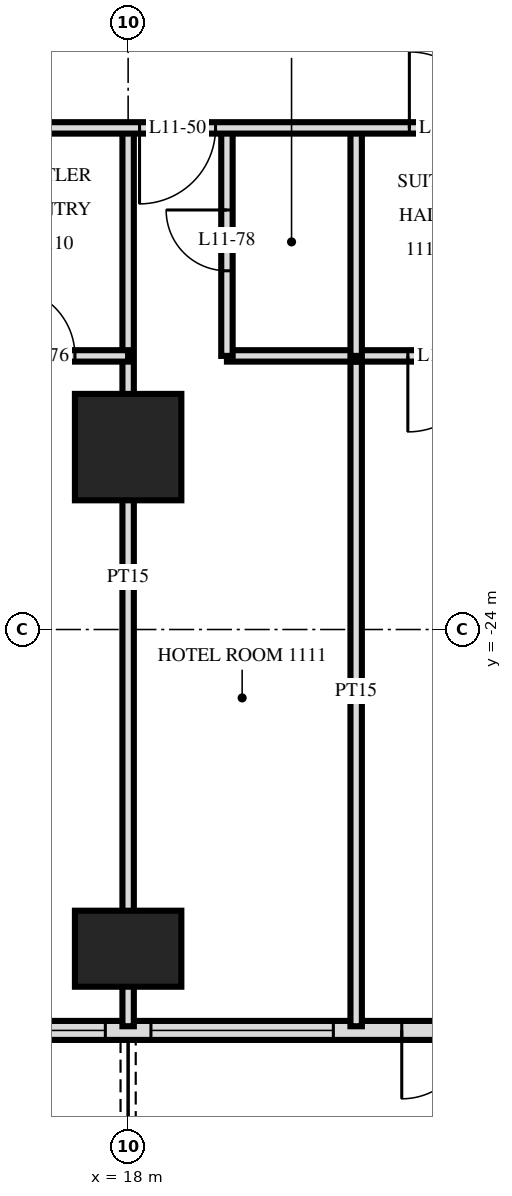
"""IFC4 building model, lengths in metres.
Left out: names, types, materials, properties, quantities, classifications, styles, units other than length and angle.
Written with IfcOpenShell. Run it as: python <this file> out.ifc"""

import sys

from ifc_helpers import new_model, si_unit, direction, frame, frame_2d, origin, origin_2d, place, context, subcontext, project, spatial, rectangle, extrude, element, fill, save


model = new_model("IFC4")
c1 = context("Model", 3, precision=1e-05, world=origin(), true_north=direction((0.0, 1.0)))
c2 = subcontext(c1, "Body", "Model", "MODEL_VIEW")
j1 = project(units=[si_unit("LENGTHUNIT", "METRE"), si_unit("PLANEANGLEUNIT", "RADIAN")], contexts=[c1])
p1 = place(None, origin())
s1 = spatial("IfcSite", under=j1, at=p1, CompositionType="ELEMENT")
p2 = place(p1, origin())
s2 = spatial("IfcBuilding", under=s1, at=p2, CompositionType="ELEMENT")
p3 = place(p2, frame((0.0, 0.0, 49.2)))
s3 = spatial("IfcBuildingStorey", under=s2, at=p3, CompositionType="ELEMENT", Elevation=49.2)
p4 = place(p3, frame((18.0, -28.2, 0.0), z_axis=(0.0, 0.0, 1.0), x_axis=(1.0, 0.0, 0.0)))
e1 = element("IfcColumn", 1, at=p4, inside=s3, PredefinedType="COLUMN", context=c2, shape_type="SweptSolid", body=[
    extrude(rectangle(XDim=1.4, YDim=1.0, at=origin_2d()), origin(), (0.0, 0.0, 1.0), 3.6),
])
p5 = place(p3, frame((18.0, -21.6, 0.0), z_axis=(0.0, 0.0, 1.0), x_axis=(1.0, 0.0, 0.0)))
e2 = element("IfcColumn", 2, at=p5, inside=s3, PredefinedType="COLUMN", context=c2, shape_type="SweptSolid", body=[
    extrude(rectangle(XDim=1.4, YDim=1.4, at=origin_2d()), origin(), (0.0, 0.0, 1.0), 3.6),
])
p6 = place(p3, frame((-28.775, -29.275, 0.0), z_axis=(0.0, 0.0, 1.0), x_axis=(1.0, 0.0, 0.0)))
e3 = element("IfcWall", 3, at=p6, inside=s3, PredefinedType="SOLIDWALL", context=c2, shape_type="SweptSolid", body=[
    extrude(rectangle(XDim=57.551, YDim=0.25, at=frame_2d((28.775, 0.0))), origin(), (0.0, 0.0, 1.0), 3.32),
])
p7 = place(p6, frame((0.575, 0.0, 0.0)))
e4 = element("IfcOpeningElement", 4, at=p7, cuts=e3, PredefinedType="OPENING", context=c2, shape_type="SweptSolid", body=[
    extrude(rectangle(XDim=1.8, YDim=2.4, at=frame_2d((0.9, 1.2))), frame((0.0, 0.135, 0.0), z_axis=(0.0, -1.0, 0.0), x_axis=(1.0, 0.0, 0.0)), (0.0, 0.0, 1.0), 0.27),
])
p8 = place(p6, frame((5.375, 0.0, 0.0)))
e5 = element("IfcOpeningElement", 5, at=p8, cuts=e3, PredefinedType="OPENING", context=c2, shape_type="SweptSolid", body=[
    extrude(rectangle(XDim=1.8, YDim=2.4, at=frame_2d((0.9, 1.2))), frame((0.0, 0.135, 0.0), z_axis=(0.0, -1.0, 0.0), x_axis=(1.0, 0.0, 0.0)), (0.0, 0.0, 1.0), 0.27),
])
p9 = place(p6, frame((8.075, 0.0, 0.3)))
e6 = element("IfcOpeningElement", 6, at=p9, cuts=e3, PredefinedType="OPENING", context=c2, shape_type="SweptSolid", body=[
    extrude(rectangle(XDim=2.4, YDim=2.1, at=frame_2d((1.2, 1.05))), frame((0.0, 0.135, 0.0), z_axis=(0.0, -1.0, 0.0), x_axis=(1.0, 0.0, 0.0)), (0.0, 0.0, 1.0), 0.27),
])
p10 = place(p6, frame((11.375, 0.0, 0.0)))
e7 = element("IfcOpeningElement", 7, at=p10, cuts=e3, PredefinedType="OPENING", context=c2, shape_type="SweptSolid", body=[
    extrude(rectangle(XDim=1.8, YDim=2.4, at=frame_2d((0.9, 1.2))), frame((0.0, 0.135, 0.0), z_axis=(0.0, -1.0, 0.0), x_axis=(1.0, 0.0, 0.0)), (0.0, 0.0, 1.0), 0.27),
])
p11 = place(p6, frame((14.075, 0.0, 0.3)))
e8 = element("IfcOpeningElement", 8, at=p11, cuts=e3, PredefinedType="OPENING", context=c2, shape_type="SweptSolid", body=[
    extrude(rectangle(XDim=2.4, YDim=2.1, at=frame_2d((1.2, 1.05))), frame((0.0, 0.135, 0.0), z_axis=(0.0, -1.0, 0.0), x_axis=(1.0, 0.0, 0.0)), (0.0, 0.0, 1.0), 0.27),
])
p12 = place(p6, frame((17.375, 0.0, 0.0)))
e9 = element("IfcOpeningElement", 9, at=p12, cuts=e3, PredefinedType="OPENING", context=c2, shape_type="SweptSolid", body=[
    extrude(rectangle(XDim=1.8, YDim=2.4, at=frame_2d((0.9, 1.2))), frame((0.0, 0.135, 0.0), z_axis=(0.0, -1.0, 0.0), x_axis=(1.0, 0.0, 0.0)), (0.0, 0.0, 1.0), 0.27),
])
p13 = place(p6, frame((20.075, 0.0, 0.3)))
e10 = element("IfcOpeningElement", 10, at=p13, cuts=e3, PredefinedType="OPENING", context=c2, shape_type="SweptSolid", body=[
    extrude(rectangle(XDim=2.4, YDim=2.1, at=frame_2d((1.2, 1.05))), frame((0.0, 0.135, 0.0), z_axis=(0.0, -1.0, 0.0), x_axis=(1.0, 0.0, 0.0)), (0.0, 0.0, 1.0), 0.27),
])
p14 = place(p6, frame((23.075, 0.0, 0.3)))
e11 = element("IfcOpeningElement", 11, at=p14, cuts=e3, PredefinedType="OPENING", context=c2, shape_type="SweptSolid", body=[
    extrude(rectangle(XDim=2.4, YDim=2.1, at=frame_2d((1.2, 1.05))), frame((0.0, 0.135, 0.0), z_axis=(0.0, -1.0, 0.0), x_axis=(1.0, 0.0, 0.0)), (0.0, 0.0, 1.0), 0.27),
])
p15 = place(p6, frame((26.375, 0.0, 0.0)))
e12 = element("IfcOpeningElement", 12, at=p15, cuts=e3, PredefinedType="OPENING", context=c2, shape_type="SweptSolid", body=[
    extrude(rectangle(XDim=1.8, YDim=2.4, at=frame_2d((0.9, 1.2))), frame((0.0, 0.135, 0.0), z_axis=(0.0, -1.0, 0.0), x_axis=(1.0, 0.0, 0.0)), (0.0, 0.0, 1.0), 0.27),
])
p16 = place(p6, frame((29.375, 0.0, 0.0)))
e13 = element("IfcOpeningElement", 13, at=p16, cuts=e3, PredefinedType="OPENING", context=c2, shape_type="SweptSolid", body=[
    extrude(rectangle(XDim=1.8, YDim=2.4, at=frame_2d((0.9, 1.2))), frame((0.0, 0.135, 0.0), z_axis=(0.0, -1.0, 0.0), x_axis=(1.0, 0.0, 0.0)), (0.0, 0.0, 1.0), 0.27),
])
p17 = place(p6, frame((32.075, 0.0, 0.3)))
e14 = element("IfcOpeningElement", 14, at=p17, cuts=e3, PredefinedType="OPENING", context=c2, shape_type="SweptSolid", body=[
    extrude(rectangle(XDim=2.4, YDim=2.1, at=frame_2d((1.2, 1.05))), frame((0.0, 0.135, 0.0), z_axis=(0.0, -1.0, 0.0), x_axis=(1.0, 0.0, 0.0)), (0.0, 0.0, 1.0), 0.27),
])
p18 = place(p6, frame((35.075, 0.0, 0.3)))
e15 = element("IfcOpeningElement", 15, at=p18, cuts=e3, PredefinedType="OPENING", context=c2, shape_type="SweptSolid", body=[
    extrude(rectangle(XDim=2.4, YDim=2.1, at=frame_2d((1.2, 1.05))), frame((0.0, 0.135, 0.0), z_axis=(0.0, -1.0, 0.0), x_axis=(1.0, 0.0, 0.0)), (0.0, 0.0, 1.0), 0.27),
])
p19 = place(p6, frame((38.375, 0.0, 0.0)))
e16 = element("IfcOpeningElement", 16, at=p19, cuts=e3, PredefinedType="OPENING", context=c2, shape_type="SweptSolid", body=[
    extrude(rectangle(XDim=1.8, YDim=2.4, at=frame_2d((0.9, 1.2))), frame((0.0, 0.135, 0.0), z_axis=(0.0, -1.0, 0.0), x_axis=(1.0, 0.0, 0.0)), (0.0, 0.0, 1.0), 0.27),
])
p20 = place(p6, frame((41.375, 0.0, 0.0)))
e17 = element("IfcOpeningElement", 17, at=p20, cuts=e3, PredefinedType="OPENING", context=c2, shape_type="SweptSolid", body=[
    extrude(rectangle(XDim=1.8, YDim=2.4, at=frame_2d((0.9, 1.2))), frame((0.0, 0.135, 0.0), z_axis=(0.0, -1.0, 0.0), x_axis=(1.0, 0.0, 0.0)), (0.0, 0.0, 1.0), 0.27),
])
p21 = place(p6, frame((44.075, 0.0, 0.3)))
e18 = element("IfcOpeningElement", 18, at=p21, cuts=e3, PredefinedType="OPENING", context=c2, shape_type="SweptSolid", body=[
    extrude(rectangle(XDim=2.4, YDim=2.1, at=frame_2d((1.2, 1.05))), frame((0.0, 0.135, 0.0), z_axis=(0.0, -1.0, 0.0), x_axis=(1.0, 0.0, 0.0)), (0.0, 0.0, 1.0), 0.27),
])
p22 = place(p6, frame((47.075, 0.0, 0.3)))
e19 = element("IfcOpeningElement", 19, at=p22, cuts=e3, PredefinedType="OPENING", context=c2, shape_type="SweptSolid", body=[
    extrude(rectangle(XDim=2.4, YDim=2.1, at=frame_2d((1.2, 1.05))), frame((0.0, 0.135, 0.0), z_axis=(0.0, -1.0, 0.0), x_axis=(1.0, 0.0, 0.0)), (0.0, 0.0, 1.0), 0.27),
])
p23 = place(p6, frame((50.375, 0.0, 0.0)))
e20 = element("IfcOpeningElement", 20, at=p23, cuts=e3, PredefinedType="OPENING", context=c2, shape_type="SweptSolid", body=[
    extrude(rectangle(XDim=1.8, YDim=2.4, at=frame_2d((0.9, 1.2))), frame((0.0, 0.135, 0.0), z_axis=(0.0, -1.0, 0.0), x_axis=(1.0, 0.0, 0.0)), (0.0, 0.0, 1.0), 0.27),
])
p24 = place(p6, frame((53.375, 0.0, 0.0)))
e21 = element("IfcOpeningElement", 21, at=p24, cuts=e3, PredefinedType="OPENING", context=c2, shape_type="SweptSolid", body=[
    extrude(rectangle(XDim=1.8, YDim=2.4, at=frame_2d((0.9, 1.2))), frame((0.0, 0.135, 0.0), z_axis=(0.0, -1.0, 0.0), x_axis=(1.0, 0.0, 0.0)), (0.0, 0.0, 1.0), 0.27),
])
p25 = place(p3, frame((21.0, -20.4, 0.0), z_axis=(0.0, 0.0, 1.0), x_axis=(0.0, 1.0, 0.0)))
e22 = element("IfcWall", 22, at=p25, inside=s3, PredefinedType="PARTITIONING", context=c2, shape_type="SweptSolid", body=[
    extrude(rectangle(XDim=3.0, YDim=0.15, at=frame_2d((1.5, 0.0))), origin(), (0.0, 0.0, 1.0), 3.32),
])
p26 = place(p3, frame((21.0, -29.22, 0.0), z_axis=(0.0, 0.0, 1.0), x_axis=(0.0, 1.0, 0.0)))
e23 = element("IfcWall", 23, at=p26, inside=s3, PredefinedType="PARTITIONING", context=c2, shape_type="SweptSolid", body=[
    extrude(rectangle(XDim=8.82, YDim=0.15, at=frame_2d((4.41, 0.0))), origin(), (0.0, 0.0, 1.0), 3.32),
])
p27 = place(p3, frame((19.3, -20.4, 0.0), z_axis=(0.0, 0.0, 1.0), x_axis=(0.0, 1.0, 0.0)))
e24 = element("IfcWall", 24, at=p27, inside=s3, PredefinedType="PARTITIONING", context=c2, shape_type="SweptSolid", body=[
    extrude(rectangle(XDim=3.0, YDim=0.15, at=frame_2d((1.5, 0.0))), origin(), (0.0, 0.0, 1.0), 3.32),
])
p28 = place(p27, frame((1.12, 0.0, 0.0)))
e25 = element("IfcOpeningElement", 25, at=p28, cuts=e24, PredefinedType="OPENING", context=c2, shape_type="SweptSolid", body=[
    extrude(rectangle(XDim=0.8, YDim=2.1, at=frame_2d((0.4, 1.05))), frame((0.0, 0.085, 0.0), z_axis=(0.0, -1.0, 0.0), x_axis=(1.0, 0.0, 0.0)), (0.0, 0.0, 1.0), 0.17),
])
p29 = place(p3, frame((18.0, -29.22, 0.0), z_axis=(0.0, 0.0, 1.0), x_axis=(0.0, 1.0, 0.0)))
e26 = element("IfcWall", 26, at=p29, inside=s3, PredefinedType="PARTITIONING", context=c2, shape_type="SweptSolid", body=[
    extrude(rectangle(XDim=11.82, YDim=0.15, at=frame_2d((5.91, 0.0))), origin(), (0.0, 0.0, 1.0), 3.32),
])
p30 = place(p3, frame((21.0, -20.4, 0.0), z_axis=(0.0, 0.0, 1.0), x_axis=(1.0, 0.0, 0.0)))
e27 = element("IfcWall", 27, at=p30, inside=s3, PredefinedType="PARTITIONING", context=c2, shape_type="SweptSolid", body=[
    extrude(rectangle(XDim=2.4, YDim=0.15, at=frame_2d((1.2, 0.0))), origin(), (0.0, 0.0, 1.0), 3.32),
])
p31 = place(p30, frame((0.68, 0.0, 0.0)))
e28 = element("IfcOpeningElement", 28, at=p31, cuts=e27, PredefinedType="OPENING", context=c2, shape_type="SweptSolid", body=[
    extrude(rectangle(XDim=1.0, YDim=2.1, at=frame_2d((0.5, 1.05))), frame((0.0, 0.085, 0.0), z_axis=(0.0, -1.0, 0.0), x_axis=(1.0, 0.0, 0.0)), (0.0, 0.0, 1.0), 0.17),
])
p32 = place(p3, frame((10.2, -20.4, 0.0), z_axis=(0.0, 0.0, 1.0), x_axis=(1.0, 0.0, 0.0)))
e29 = element("IfcWall", 29, at=p32, inside=s3, PredefinedType="PARTITIONING", context=c2, shape_type="SweptSolid", body=[
    extrude(rectangle(XDim=7.8, YDim=0.15, at=frame_2d((3.9, 0.0))), origin(), (0.0, 0.0, 1.0), 3.32),
])
p33 = place(p32, frame((0.25, 0.0, 0.0)))
e30 = element("IfcOpeningElement", 30, at=p33, cuts=e29, PredefinedType="OPENING", context=c2, shape_type="SweptSolid", body=[
    extrude(rectangle(XDim=0.8, YDim=2.1, at=frame_2d((0.4, 1.05))), frame((0.0, 0.085, 0.0), z_axis=(0.0, -1.0, 0.0), x_axis=(1.0, 0.0, 0.0)), (0.0, 0.0, 1.0), 0.17),
])
p34 = place(p32, frame((4.03, 0.0, 0.0)))
e31 = element("IfcOpeningElement", 31, at=p34, cuts=e29, PredefinedType="OPENING", context=c2, shape_type="SweptSolid", body=[
    extrude(rectangle(XDim=0.9, YDim=2.1, at=frame_2d((0.45, 1.05))), frame((0.0, 0.085, 0.0), z_axis=(0.0, -1.0, 0.0), x_axis=(1.0, 0.0, 0.0)), (0.0, 0.0, 1.0), 0.17),
])
p35 = place(p32, frame((6.2, 0.0, 0.0)))
e32 = element("IfcOpeningElement", 32, at=p35, cuts=e29, PredefinedType="OPENING", context=c2, shape_type="SweptSolid", body=[
    extrude(rectangle(XDim=0.9, YDim=2.1, at=frame_2d((0.45, 1.05))), frame((0.0, 0.085, 0.0), z_axis=(0.0, -1.0, 0.0), x_axis=(1.0, 0.0, 0.0)), (0.0, 0.0, 1.0), 0.17),
])
p36 = place(p3, frame((19.3, -20.4, 0.0), z_axis=(0.0, 0.0, 1.0), x_axis=(1.0, 0.0, 0.0)))
e33 = element("IfcWall", 33, at=p36, inside=s3, PredefinedType="PARTITIONING", context=c2, shape_type="SweptSolid", body=[
    extrude(rectangle(XDim=1.7, YDim=0.15, at=frame_2d((0.85, 0.0))), origin(), (0.0, 0.0, 1.0), 3.32),
])
p37 = place(p3, frame((-33.12, -17.4, 0.0), z_axis=(0.0, 0.0, 1.0), x_axis=(1.0, 0.0, 0.0)))
e34 = element("IfcWall", 34, at=p37, inside=s3, PredefinedType="PARTITIONING", context=c2, shape_type="SweptSolid", body=[
    extrude(rectangle(XDim=66.24, YDim=0.15, at=frame_2d((33.12, 0.0))), origin(), (0.0, 0.0, 1.0), 3.32),
])
p38 = place(p37, frame((9.27, 0.0, 0.0)))
e35 = element("IfcOpeningElement", 35, at=p38, cuts=e34, PredefinedType="OPENING", context=c2, shape_type="SweptSolid", body=[
    extrude(rectangle(XDim=1.0, YDim=2.1, at=frame_2d((0.5, 1.05))), frame((0.0, 0.085, 0.0), z_axis=(0.0, -1.0, 0.0), x_axis=(1.0, 0.0, 0.0)), (0.0, 0.0, 1.0), 0.17),
])
p39 = place(p37, frame((13.97, 0.0, 0.0)))
e36 = element("IfcOpeningElement", 36, at=p39, cuts=e34, PredefinedType="OPENING", context=c2, shape_type="SweptSolid", body=[
    extrude(rectangle(XDim=1.0, YDim=2.1, at=frame_2d((0.5, 1.05))), frame((0.0, 0.085, 0.0), z_axis=(0.0, -1.0, 0.0), x_axis=(1.0, 0.0, 0.0)), (0.0, 0.0, 1.0), 0.17),
])
p40 = place(p37, frame((15.27, 0.0, 0.0)))
e37 = element("IfcOpeningElement", 37, at=p40, cuts=e34, PredefinedType="OPENING", context=c2, shape_type="SweptSolid", body=[
    extrude(rectangle(XDim=1.0, YDim=2.1, at=frame_2d((0.5, 1.05))), frame((0.0, 0.085, 0.0), z_axis=(0.0, -1.0, 0.0), x_axis=(1.0, 0.0, 0.0)), (0.0, 0.0, 1.0), 0.17),
])
p41 = place(p37, frame((19.97, 0.0, 0.0)))
e38 = element("IfcOpeningElement", 38, at=p41, cuts=e34, PredefinedType="OPENING", context=c2, shape_type="SweptSolid", body=[
    extrude(rectangle(XDim=1.0, YDim=2.1, at=frame_2d((0.5, 1.05))), frame((0.0, 0.085, 0.0), z_axis=(0.0, -1.0, 0.0), x_axis=(1.0, 0.0, 0.0)), (0.0, 0.0, 1.0), 0.17),
])
p42 = place(p37, frame((22.27, 0.0, 0.0)))
e39 = element("IfcOpeningElement", 39, at=p42, cuts=e34, PredefinedType="OPENING", context=c2, shape_type="SweptSolid", body=[
    extrude(rectangle(XDim=1.0, YDim=2.1, at=frame_2d((0.5, 1.05))), frame((0.0, 0.085, 0.0), z_axis=(0.0, -1.0, 0.0), x_axis=(1.0, 0.0, 0.0)), (0.0, 0.0, 1.0), 0.17),
])
p43 = place(p37, frame((28.97, 0.0, 0.0)))
e40 = element("IfcOpeningElement", 40, at=p43, cuts=e34, PredefinedType="OPENING", context=c2, shape_type="SweptSolid", body=[
    extrude(rectangle(XDim=1.0, YDim=2.1, at=frame_2d((0.5, 1.05))), frame((0.0, 0.085, 0.0), z_axis=(0.0, -1.0, 0.0), x_axis=(1.0, 0.0, 0.0)), (0.0, 0.0, 1.0), 0.17),
])
p44 = place(p37, frame((30.27, 0.0, 0.0)))
e41 = element("IfcOpeningElement", 41, at=p44, cuts=e34, PredefinedType="OPENING", context=c2, shape_type="SweptSolid", body=[
    extrude(rectangle(XDim=1.0, YDim=2.1, at=frame_2d((0.5, 1.05))), frame((0.0, 0.085, 0.0), z_axis=(0.0, -1.0, 0.0), x_axis=(1.0, 0.0, 0.0)), (0.0, 0.0, 1.0), 0.17),
])
p45 = place(p37, frame((34.97, 0.0, 0.0)))
e42 = element("IfcOpeningElement", 42, at=p45, cuts=e34, PredefinedType="OPENING", context=c2, shape_type="SweptSolid", body=[
    extrude(rectangle(XDim=1.0, YDim=2.1, at=frame_2d((0.5, 1.05))), frame((0.0, 0.085, 0.0), z_axis=(0.0, -1.0, 0.0), x_axis=(1.0, 0.0, 0.0)), (0.0, 0.0, 1.0), 0.17),
])
p46 = place(p37, frame((36.27, 0.0, 0.0)))
e43 = element("IfcOpeningElement", 43, at=p46, cuts=e34, PredefinedType="OPENING", context=c2, shape_type="SweptSolid", body=[
    extrude(rectangle(XDim=1.0, YDim=2.1, at=frame_2d((0.5, 1.05))), frame((0.0, 0.085, 0.0), z_axis=(0.0, -1.0, 0.0), x_axis=(1.0, 0.0, 0.0)), (0.0, 0.0, 1.0), 0.17),
])
p47 = place(p37, frame((39.82, 0.0, 0.0)))
e44 = element("IfcOpeningElement", 44, at=p47, cuts=e34, PredefinedType="OPENING", context=c2, shape_type="SweptSolid", body=[
    extrude(rectangle(XDim=1.0, YDim=2.1, at=frame_2d((0.5, 1.05))), frame((0.0, 0.085, 0.0), z_axis=(0.0, -1.0, 0.0), x_axis=(1.0, 0.0, 0.0)), (0.0, 0.0, 1.0), 0.17),
])
p48 = place(p37, frame((51.27, 0.0, 0.0)))
e45 = element("IfcOpeningElement", 45, at=p48, cuts=e34, PredefinedType="OPENING", context=c2, shape_type="SweptSolid", body=[
    extrude(rectangle(XDim=1.0, YDim=2.1, at=frame_2d((0.5, 1.05))), frame((0.0, 0.085, 0.0), z_axis=(0.0, -1.0, 0.0), x_axis=(1.0, 0.0, 0.0)), (0.0, 0.0, 1.0), 0.17),
])
p49 = place(p37, frame((4.42, 0.0, 0.0)))
e46 = element("IfcOpeningElement", 46, at=p49, cuts=e34, PredefinedType="OPENING", context=c2, shape_type="SweptSolid", body=[
    extrude(rectangle(XDim=1.0, YDim=2.1, at=frame_2d((0.5, 1.05))), frame((0.0, 0.085, 0.0), z_axis=(0.0, -1.0, 0.0), x_axis=(1.0, 0.0, 0.0)), (0.0, 0.0, 1.0), 0.17),
])
p50 = place(p37, frame((54.82, 0.0, 0.0)))
e47 = element("IfcOpeningElement", 47, at=p50, cuts=e34, PredefinedType="OPENING", context=c2, shape_type="SweptSolid", body=[
    extrude(rectangle(XDim=1.0, YDim=2.1, at=frame_2d((0.5, 1.05))), frame((0.0, 0.085, 0.0), z_axis=(0.0, -1.0, 0.0), x_axis=(1.0, 0.0, 0.0)), (0.0, 0.0, 1.0), 0.17),
])
p51 = place(p21, origin())
e48 = element("IfcWindow", 48, at=p51, inside=s3, PartitioningType="SINGLE_PANEL", PredefinedType="WINDOW", context=c2, shape_type="SweptSolid", body=[
    extrude(rectangle(XDim=2.4, YDim=2.1, at=frame_2d((1.2, 1.05))), frame((0.0, 0.03, 0.0), z_axis=(0.0, -1.0, 0.0), x_axis=(1.0, 0.0, 0.0)), (0.0, 0.0, 1.0), 0.06),
])
fill(e18, e48)
p52 = place(p22, origin())
e49 = element("IfcWindow", 49, at=p52, inside=s3, PartitioningType="SINGLE_PANEL", PredefinedType="WINDOW", context=c2, shape_type="SweptSolid", body=[
    extrude(rectangle(XDim=2.4, YDim=2.1, at=frame_2d((1.2, 1.05))), frame((0.0, 0.03, 0.0), z_axis=(0.0, -1.0, 0.0), x_axis=(1.0, 0.0, 0.0)), (0.0, 0.0, 1.0), 0.06),
])
fill(e19, e49)
p53 = place(p23, frame((0.9, 0.0, 0.0), z_axis=(0.0, 0.0, 1.0), x_axis=(-1.0, 0.0, 0.0)))
e50 = element("IfcDoor", 50, at=p53, inside=s3, OperationType="DOUBLE_DOOR_SINGLE_SWING", PredefinedType="DOOR", context=c2, shape_type="SweptSolid", body=[
    extrude(rectangle(XDim=1.8, YDim=2.4, at=frame_2d((0.0, 1.2))), frame((0.0, -0.025, 0.0), z_axis=(0.0, 1.0, 0.0), x_axis=(-1.0, 0.0, 0.0)), (0.0, 0.0, 1.0), 0.05),
])
fill(e20, e50)
p54 = place(p48, frame((0.5, 0.0, 0.0), z_axis=(0.0, 0.0, 1.0), x_axis=(-1.0, 0.0, 0.0)))
e51 = element("IfcDoor", 51, at=p54, inside=s3, OperationType="SINGLE_SWING_LEFT", PredefinedType="DOOR", context=c2, shape_type="SweptSolid", body=[
    extrude(rectangle(XDim=1.0, YDim=2.1, at=frame_2d((0.0, 1.05))), frame((0.0, -0.025, 0.0), z_axis=(0.0, 1.0, 0.0), x_axis=(-1.0, 0.0, 0.0)), (0.0, 0.0, 1.0), 0.05),
])
fill(e45, e51)
p55 = place(p50, origin())
e52 = element("IfcDoor", 52, at=p55, inside=s3, OperationType="SINGLE_SWING_RIGHT", PredefinedType="DOOR", context=c2, shape_type="SweptSolid", body=[
    extrude(rectangle(XDim=1.0, YDim=2.1, at=frame_2d((0.5, 1.05))), frame((0.0, 0.025, 0.0), z_axis=(0.0, -1.0, 0.0), x_axis=(1.0, 0.0, 0.0)), (0.0, 0.0, 1.0), 0.05),
])
fill(e47, e52)
p56 = place(p35, origin())
e53 = element("IfcDoor", 53, at=p56, inside=s3, OperationType="SINGLE_SWING_RIGHT", PredefinedType="DOOR", context=c2, shape_type="SweptSolid", body=[
    extrude(rectangle(XDim=0.9, YDim=2.1, at=frame_2d((0.45, 1.05))), frame((0.0, 0.025, 0.0), z_axis=(0.0, -1.0, 0.0), x_axis=(1.0, 0.0, 0.0)), (0.0, 0.0, 1.0), 0.05),
])
fill(e32, e53)
p57 = place(p28, origin())
e54 = element("IfcDoor", 54, at=p57, inside=s3, OperationType="SINGLE_SWING_LEFT", PredefinedType="DOOR", context=c2, shape_type="SweptSolid", body=[
    extrude(rectangle(XDim=0.8, YDim=2.1, at=frame_2d((0.4, 1.05))), frame((0.0, 0.025, 0.0), z_axis=(0.0, -1.0, 0.0), x_axis=(1.0, 0.0, 0.0)), (0.0, 0.0, 1.0), 0.05),
])
fill(e25, e54)
p58 = place(p31, frame((0.5, 0.0, 0.0), z_axis=(0.0, 0.0, 1.0), x_axis=(-1.0, 0.0, 0.0)))
e55 = element("IfcDoor", 55, at=p58, inside=s3, OperationType="SINGLE_SWING_LEFT", PredefinedType="DOOR", context=c2, shape_type="SweptSolid", body=[
    extrude(rectangle(XDim=1.0, YDim=2.1, at=frame_2d((0.0, 1.05))), frame((0.0, -0.025, 0.0), z_axis=(0.0, 1.0, 0.0), x_axis=(-1.0, 0.0, 0.0)), (0.0, 0.0, 1.0), 0.05),
])
fill(e28, e55)
save(model, sys.argv[1])
